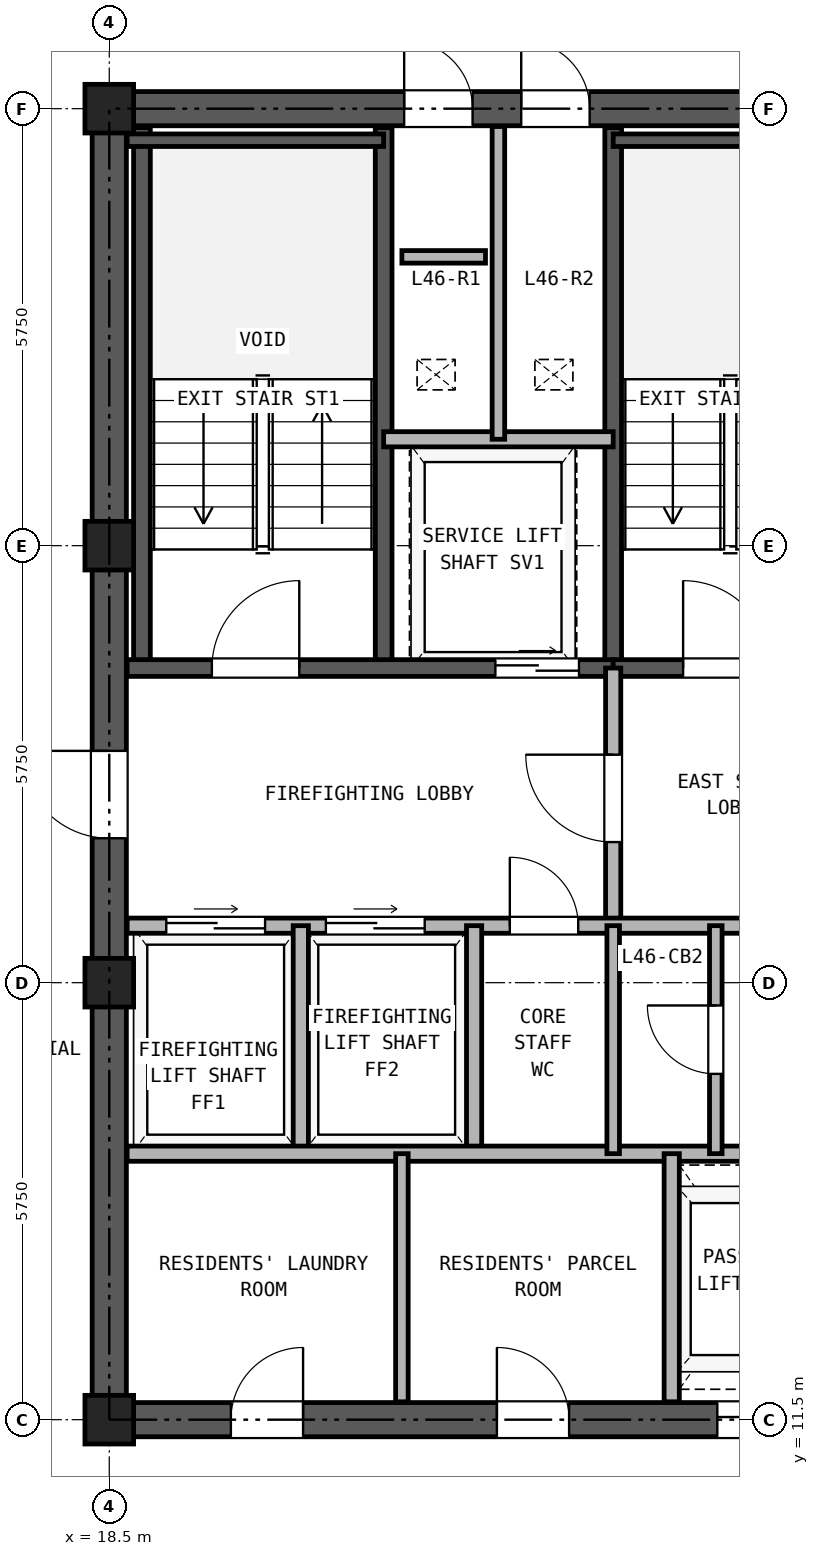
"""IFC4 building model, lengths in metres.
Left out: names, types, materials, properties, quantities, classifications, styles, units other than length and angle.
Written with IfcOpenShell. Run it as: python <this file> out.ifc"""

import sys

from ifc_helpers import new_model, si_unit, direction, frame, frame_2d, origin, origin_2d, place, context, subcontext, project, spatial, rectangle, hollow_rectangle, extrude, source, transform, mapped, element, fill, save


model = new_model("IFC4")
c1 = context("Model", 3, precision=1e-05, world=origin(), true_north=direction((0.0, 1.0)))
c2 = subcontext(c1, "Body", "Model", "MODEL_VIEW")
j1 = project(units=[si_unit("LENGTHUNIT", "METRE"), si_unit("PLANEANGLEUNIT", "RADIAN")], contexts=[c1])
p1 = place(None, origin())
s1 = spatial("IfcSite", under=j1, at=p1, CompositionType="ELEMENT")
p2 = place(p1, origin())
s2 = spatial("IfcBuilding", under=s1, at=p2, CompositionType="ELEMENT")
p3 = place(p2, frame((0.0, 0.0, 165.7)))
s3 = spatial("IfcBuildingStorey", under=s2, at=p3, CompositionType="ELEMENT", Elevation=165.7)
m1 = source(origin(), c2, "Body", "SweptSolid", [
    extrude(hollow_rectangle(XDim=0.64, YDim=0.64, WallThickness=0.035, at=origin_2d()), origin(), (0.0, 0.0, 1.0), 2.95),
])
for number, where, z_axis, x_axis in (
    (1, (18.5, 11.5, 0.0), (0.0, 0.0, 1.0), (1.0, 0.0, 0.0)),
    (2, (18.5, 17.25, 0.0), (0.0, 0.0, 1.0), (1.0, 0.0, 0.0)),
    (3, (18.5, 23.0, 0.0), (0.0, 0.0, 1.0), (1.0, 0.0, 0.0)),
    (4, (18.5, 28.75, 0.0), (0.0, 0.0, 1.0), (1.0, 0.0, 0.0)),
):
    element("IfcColumn", number, at=place(p3, frame(where, z_axis=z_axis, x_axis=x_axis)), inside=s3, PredefinedType="COLUMN", context=c2, shape_type="MappedRepresentation", body=[
        mapped(m1, transform((0.0, 0.0, 0.0), x_axis=(1.0, 0.0, 0.0), y_axis=(0.0, 1.0, 0.0), z_axis=(0.0, 0.0, 1.0), scale=1.0)),
    ])
p4 = place(p3, frame((18.275, 11.5, 0.0), z_axis=(0.0, 0.0, 1.0), x_axis=(1.0, 0.0, 0.0)))
e5 = element("IfcWall", 5, at=p4, inside=s3, PredefinedType="SHEAR", context=c2, shape_type="SweptSolid", body=[
    extrude(rectangle(XDim=10.45, YDim=0.45, at=frame_2d((5.225, 0.0))), origin(), (0.0, 0.0, 1.0), 2.95),
])
p5 = place(p4, frame((1.825, 0.0, 0.0)))
e6 = element("IfcOpeningElement", 6, at=p5, cuts=e5, PredefinedType="OPENING", context=c2, shape_type="SweptSolid", body=[
    extrude(rectangle(XDim=0.95, YDim=2.15, at=frame_2d((0.475, 1.075))), frame((0.0, 0.235, 0.0), z_axis=(0.0, -1.0, 0.0), x_axis=(1.0, 0.0, 0.0)), (0.0, 0.0, 1.0), 0.47),
])
p6 = place(p4, frame((5.325, 0.0, 0.0)))
e7 = element("IfcOpeningElement", 7, at=p6, cuts=e5, PredefinedType="OPENING", context=c2, shape_type="SweptSolid", body=[
    extrude(rectangle(XDim=0.95, YDim=2.15, at=frame_2d((0.475, 1.075))), frame((0.0, 0.235, 0.0), z_axis=(0.0, -1.0, 0.0), x_axis=(1.0, 0.0, 0.0)), (0.0, 0.0, 1.0), 0.47),
])
p7 = place(p4, frame((8.225, 0.0, 0.0)))
e8 = element("IfcOpeningElement", 8, at=p7, cuts=e5, PredefinedType="OPENING", context=c2, shape_type="SweptSolid", body=[
    extrude(rectangle(XDim=1.1, YDim=2.25, at=frame_2d((0.55, 1.125))), frame((0.0, 0.235, 0.0), z_axis=(0.0, -1.0, 0.0), x_axis=(1.0, 0.0, 0.0)), (0.0, 0.0, 1.0), 0.47),
])
p8 = place(p3, frame((18.275, 28.75, 0.0), z_axis=(0.0, 0.0, 1.0), x_axis=(1.0, 0.0, 0.0)))
e9 = element("IfcWall", 9, at=p8, inside=s3, PredefinedType="SHEAR", context=c2, shape_type="SweptSolid", body=[
    extrude(rectangle(XDim=10.45, YDim=0.45, at=frame_2d((5.225, 0.0))), origin(), (0.0, 0.0, 1.0), 2.95),
])
p9 = place(p8, frame((4.105, 0.0, 0.0)))
e10 = element("IfcOpeningElement", 10, at=p9, cuts=e9, PredefinedType="OPENING", context=c2, shape_type="SweptSolid", body=[
    extrude(rectangle(XDim=0.9, YDim=2.05, at=frame_2d((0.45, 1.025))), frame((0.0, 0.235, 0.0), z_axis=(0.0, -1.0, 0.0), x_axis=(1.0, 0.0, 0.0)), (0.0, 0.0, 1.0), 0.47),
])
p10 = place(p8, frame((5.645, 0.0, 0.0)))
e11 = element("IfcOpeningElement", 11, at=p10, cuts=e9, PredefinedType="OPENING", context=c2, shape_type="SweptSolid", body=[
    extrude(rectangle(XDim=0.9, YDim=2.05, at=frame_2d((0.45, 1.025))), frame((0.0, 0.235, 0.0), z_axis=(0.0, -1.0, 0.0), x_axis=(1.0, 0.0, 0.0)), (0.0, 0.0, 1.0), 0.47),
])
p11 = place(p3, frame((18.5, 11.725, 0.0), z_axis=(0.0, 0.0, 1.0), x_axis=(0.0, 1.0, 0.0)))
e12 = element("IfcWall", 12, at=p11, inside=s3, PredefinedType="SHEAR", context=c2, shape_type="SweptSolid", body=[
    extrude(rectangle(XDim=16.8, YDim=0.45, at=frame_2d((8.4, 0.0))), origin(), (0.0, 0.0, 1.0), 2.95),
])
p12 = place(p11, frame((7.425, 0.0, 0.0)))
e13 = element("IfcOpeningElement", 13, at=p12, cuts=e12, PredefinedType="OPENING", context=c2, shape_type="SweptSolid", body=[
    extrude(rectangle(XDim=1.15, YDim=2.2, at=frame_2d((0.575, 1.1))), frame((0.0, 0.235, 0.0), z_axis=(0.0, -1.0, 0.0), x_axis=(1.0, 0.0, 0.0)), (0.0, 0.0, 1.0), 0.47),
])
for number, where, z_axis, x_axis in (
    (14, (18.93, 21.39, 0.0), (0.0, 0.0, 1.0), (0.0, 1.0, 0.0)),
    (15, (22.11, 21.39, 0.0), (0.0, 0.0, 1.0), (0.0, 1.0, 0.0)),
    (16, (25.13, 21.39, 0.0), (0.0, 0.0, 1.0), (0.0, 1.0, 0.0)),
):
    element("IfcWall", number, at=place(p3, frame(where, z_axis=z_axis, x_axis=x_axis)), inside=s3, PredefinedType="SOLIDWALL", context=c2, shape_type="SweptSolid", body=[
        extrude(rectangle(XDim=7.11, YDim=0.22, at=frame_2d((3.555, 0.0))), origin(), (0.0, 0.0, 1.0), 2.95),
    ])
p13 = place(p3, frame((18.735, 28.335, 0.0), z_axis=(0.0, 0.0, 1.0), x_axis=(1.0, 0.0, 0.0)))
e17 = element("IfcWall", 17, at=p13, inside=s3, PredefinedType="PARTITIONING", context=c2, shape_type="SweptSolid", body=[
    extrude(rectangle(XDim=3.375, YDim=0.165, at=frame_2d((1.688, 0.0))), origin(), (0.0, 0.0, 1.0), 2.95),
])
p14 = place(p3, frame((25.13, 28.335, 0.0), z_axis=(0.0, 0.0, 1.0), x_axis=(1.0, 0.0, 0.0)))
e18 = element("IfcWall", 18, at=p14, inside=s3, PredefinedType="PARTITIONING", context=c2, shape_type="SweptSolid", body=[
    extrude(rectangle(XDim=3.135, YDim=0.165, at=frame_2d((1.567, 0.0))), origin(), (0.0, 0.0, 1.0), 2.95),
])
p15 = place(p3, frame((18.735, 21.39, 0.0), z_axis=(0.0, 0.0, 1.0), x_axis=(1.0, 0.0, 0.0)))
e19 = element("IfcWall", 19, at=p15, inside=s3, PredefinedType="SOLIDWALL", context=c2, shape_type="SweptSolid", body=[
    extrude(rectangle(XDim=6.395, YDim=0.22, at=frame_2d((3.197, 0.0))), origin(), (0.0, 0.0, 1.0), 2.95),
])
p16 = place(p15, frame((1.115, 0.0, 0.0)))
e20 = element("IfcOpeningElement", 20, at=p16, cuts=e19, PredefinedType="OPENING", context=c2, shape_type="SweptSolid", body=[
    extrude(rectangle(XDim=1.15, YDim=2.2, at=frame_2d((0.575, 1.1))), frame((0.0, 0.12, 0.0), z_axis=(0.0, -1.0, 0.0), x_axis=(1.0, 0.0, 0.0)), (0.0, 0.0, 1.0), 0.24),
])
p17 = place(p15, frame((4.845, 0.0, 0.0)))
e21 = element("IfcOpeningElement", 21, at=p17, cuts=e19, PredefinedType="OPENING", context=c2, shape_type="SweptSolid", body=[
    extrude(rectangle(XDim=1.1, YDim=2.25, at=frame_2d((0.55, 1.125))), frame((0.0, 0.12, 0.0), z_axis=(0.0, -1.0, 0.0), x_axis=(1.0, 0.0, 0.0)), (0.0, 0.0, 1.0), 0.24),
])
p18 = place(p3, frame((25.13, 21.39, 0.0), z_axis=(0.0, 0.0, 1.0), x_axis=(1.0, 0.0, 0.0)))
e22 = element("IfcWall", 22, at=p18, inside=s3, PredefinedType="SOLIDWALL", context=c2, shape_type="SweptSolid", body=[
    extrude(rectangle(XDim=3.135, YDim=0.22, at=frame_2d((1.567, 0.0))), origin(), (0.0, 0.0, 1.0), 2.95),
])
p19 = place(p18, frame((0.92, 0.0, 0.0)))
e23 = element("IfcOpeningElement", 23, at=p19, cuts=e22, PredefinedType="OPENING", context=c2, shape_type="SweptSolid", body=[
    extrude(rectangle(XDim=1.15, YDim=2.2, at=frame_2d((0.575, 1.1))), frame((0.0, 0.12, 0.0), z_axis=(0.0, -1.0, 0.0), x_axis=(1.0, 0.0, 0.0)), (0.0, 0.0, 1.0), 0.24),
])
p20 = place(p3, frame((22.11, 24.4, 0.0), z_axis=(0.0, 0.0, 1.0), x_axis=(1.0, 0.0, 0.0)))
e24 = element("IfcWall", 24, at=p20, inside=s3, PredefinedType="PARTITIONING", context=c2, shape_type="SweptSolid", body=[
    extrude(rectangle(XDim=3.02, YDim=0.2, at=frame_2d((1.51, 0.0))), origin(), (0.0, 0.0, 1.0), 2.95),
])
p21 = place(p3, frame((23.62, 24.4, 0.0), z_axis=(0.0, 0.0, 1.0), x_axis=(0.0, 1.0, 0.0)))
e25 = element("IfcWall", 25, at=p21, inside=s3, PredefinedType="PARTITIONING", context=c2, shape_type="SweptSolid", body=[
    extrude(rectangle(XDim=4.115, YDim=0.165, at=frame_2d((2.058, 0.0))), origin(), (0.0, 0.0, 1.0), 2.95),
])
p22 = place(p3, frame((25.13, 18.0, 0.0), z_axis=(0.0, 0.0, 1.0), x_axis=(0.0, 1.0, 0.0)))
e26 = element("IfcWall", 26, at=p22, inside=s3, PredefinedType="PARTITIONING", context=c2, shape_type="SweptSolid", body=[
    extrude(rectangle(XDim=3.39, YDim=0.2, at=frame_2d((1.695, 0.0))), origin(), (0.0, 0.0, 1.0), 2.95),
])
p23 = place(p22, frame((1.1, 0.0, 0.0)))
e27 = element("IfcOpeningElement", 27, at=p23, cuts=e26, PredefinedType="OPENING", context=c2, shape_type="SweptSolid", body=[
    extrude(rectangle(XDim=1.15, YDim=2.2, at=frame_2d((0.575, 1.1))), frame((0.0, 0.11, 0.0), z_axis=(0.0, -1.0, 0.0), x_axis=(1.0, 0.0, 0.0)), (0.0, 0.0, 1.0), 0.22),
])
p24 = place(p3, frame((18.735, 18.0, 0.0), z_axis=(0.0, 0.0, 1.0), x_axis=(1.0, 0.0, 0.0)))
e28 = element("IfcWall", 28, at=p24, inside=s3, PredefinedType="PARTITIONING", context=c2, shape_type="SweptSolid", body=[
    extrude(rectangle(XDim=9.53, YDim=0.2, at=frame_2d((4.765, 0.0))), origin(), (0.0, 0.0, 1.0), 2.95),
])
p25 = place(p24, frame((0.515, 0.0, 0.0)))
e29 = element("IfcOpeningElement", 29, at=p25, cuts=e28, PredefinedType="OPENING", context=c2, shape_type="SweptSolid", body=[
    extrude(rectangle(XDim=1.3, YDim=2.3, at=frame_2d((0.65, 1.15))), frame((0.0, 0.11, 0.0), z_axis=(0.0, -1.0, 0.0), x_axis=(1.0, 0.0, 0.0)), (0.0, 0.0, 1.0), 0.22),
])
p26 = place(p24, frame((2.615, 0.0, 0.0)))
e30 = element("IfcOpeningElement", 30, at=p26, cuts=e28, PredefinedType="OPENING", context=c2, shape_type="SweptSolid", body=[
    extrude(rectangle(XDim=1.3, YDim=2.3, at=frame_2d((0.65, 1.15))), frame((0.0, 0.11, 0.0), z_axis=(0.0, -1.0, 0.0), x_axis=(1.0, 0.0, 0.0)), (0.0, 0.0, 1.0), 0.22),
])
p27 = place(p24, frame((5.035, 0.0, 0.0)))
e31 = element("IfcOpeningElement", 31, at=p27, cuts=e28, PredefinedType="OPENING", context=c2, shape_type="SweptSolid", body=[
    extrude(rectangle(XDim=0.9, YDim=2.05, at=frame_2d((0.45, 1.025))), frame((0.0, 0.11, 0.0), z_axis=(0.0, -1.0, 0.0), x_axis=(1.0, 0.0, 0.0)), (0.0, 0.0, 1.0), 0.22),
])
p28 = place(p24, frame((8.165, 0.0, 0.0)))
e32 = element("IfcOpeningElement", 32, at=p28, cuts=e28, PredefinedType="OPENING", context=c2, shape_type="SweptSolid", body=[
    extrude(rectangle(XDim=0.9, YDim=2.05, at=frame_2d((0.45, 1.025))), frame((0.0, 0.11, 0.0), z_axis=(0.0, -1.0, 0.0), x_axis=(1.0, 0.0, 0.0)), (0.0, 0.0, 1.0), 0.22),
])
for number, where, z_axis, x_axis in (
    (33, (21.02, 15.0, 0.0), (0.0, 0.0, 1.0), (0.0, 1.0, 0.0)),
    (34, (23.3, 15.0, 0.0), (0.0, 0.0, 1.0), (0.0, 1.0, 0.0)),
):
    element("IfcWall", number, at=place(p3, frame(where, z_axis=z_axis, x_axis=x_axis)), inside=s3, PredefinedType="PARTITIONING", context=c2, shape_type="SweptSolid", body=[
        extrude(rectangle(XDim=3.0, YDim=0.2, at=frame_2d((1.5, 0.0))), origin(), (0.0, 0.0, 1.0), 2.95),
    ])
p29 = place(p3, frame((18.735, 15.0, 0.0), z_axis=(0.0, 0.0, 1.0), x_axis=(1.0, 0.0, 0.0)))
e35 = element("IfcWall", 35, at=p29, inside=s3, PredefinedType="PARTITIONING", context=c2, shape_type="SweptSolid", body=[
    extrude(rectangle(XDim=9.53, YDim=0.2, at=frame_2d((4.765, 0.0))), origin(), (0.0, 0.0, 1.0), 2.95),
])
p30 = place(p3, frame((25.13, 15.0, 0.0), z_axis=(0.0, 0.0, 1.0), x_axis=(0.0, 1.0, 0.0)))
e36 = element("IfcWall", 36, at=p30, inside=s3, PredefinedType="PARTITIONING", context=c2, shape_type="SweptSolid", body=[
    extrude(rectangle(XDim=3.0, YDim=0.165, at=frame_2d((1.5, 0.0))), origin(), (0.0, 0.0, 1.0), 2.95),
])
p31 = place(p3, frame((26.48, 15.0, 0.0), z_axis=(0.0, 0.0, 1.0), x_axis=(0.0, 1.0, 0.0)))
e37 = element("IfcWall", 37, at=p31, inside=s3, PredefinedType="PARTITIONING", context=c2, shape_type="SweptSolid", body=[
    extrude(rectangle(XDim=3.0, YDim=0.165, at=frame_2d((1.5, 0.0))), origin(), (0.0, 0.0, 1.0), 2.95),
])
p32 = place(p31, frame((1.05, 0.0, 0.0)))
e38 = element("IfcOpeningElement", 38, at=p32, cuts=e37, PredefinedType="OPENING", context=c2, shape_type="SweptSolid", body=[
    extrude(rectangle(XDim=0.9, YDim=2.05, at=frame_2d((0.45, 1.025))), frame((0.0, 0.093, 0.0), z_axis=(0.0, -1.0, 0.0), x_axis=(1.0, 0.0, 0.0)), (0.0, 0.0, 1.0), 0.185),
])
p33 = place(p3, frame((22.35, 11.735, 0.0), z_axis=(0.0, 0.0, 1.0), x_axis=(0.0, 1.0, 0.0)))
e39 = element("IfcWall", 39, at=p33, inside=s3, PredefinedType="PARTITIONING", context=c2, shape_type="SweptSolid", body=[
    extrude(rectangle(XDim=3.265, YDim=0.165, at=frame_2d((1.632, 0.0))), origin(), (0.0, 0.0, 1.0), 2.95),
])
p34 = place(p3, frame((25.9, 11.735, 0.0), z_axis=(0.0, 0.0, 1.0), x_axis=(0.0, 1.0, 0.0)))
e40 = element("IfcWall", 40, at=p34, inside=s3, PredefinedType="PARTITIONING", context=c2, shape_type="SweptSolid", body=[
    extrude(rectangle(XDim=3.265, YDim=0.2, at=frame_2d((1.632, 0.0))), origin(), (0.0, 0.0, 1.0), 2.95),
])
p35 = place(p3, frame((22.35, 26.8, 0.0), z_axis=(0.0, 0.0, 1.0), x_axis=(1.0, 0.0, 0.0)))
e41 = element("IfcWall", 41, at=p35, inside=s3, PredefinedType="PARTITIONING", context=c2, shape_type="SweptSolid", body=[
    extrude(rectangle(XDim=1.1, YDim=0.165, at=frame_2d((0.55, 0.0))), origin(), (0.0, 0.0, 1.0), 2.95),
])
p36 = place(p16, frame((1.15, 0.0, 0.0), z_axis=(0.0, 0.0, 1.0), x_axis=(-1.0, 0.0, 0.0)))
e42 = element("IfcDoor", 42, at=p36, inside=s3, OperationType="SINGLE_SWING_RIGHT", PredefinedType="DOOR", context=c2, shape_type="SweptSolid", body=[
    extrude(rectangle(XDim=1.15, YDim=2.2, at=frame_2d((0.575, 1.1))), frame((0.0, 0.025, 0.0), z_axis=(0.0, -1.0, 0.0), x_axis=(1.0, 0.0, 0.0)), (0.0, 0.0, 1.0), 0.05),
])
fill(e20, e42)
p37 = place(p19, frame((1.15, 0.0, 0.0), z_axis=(0.0, 0.0, 1.0), x_axis=(-1.0, 0.0, 0.0)))
e43 = element("IfcDoor", 43, at=p37, inside=s3, OperationType="SINGLE_SWING_LEFT", PredefinedType="DOOR", context=c2, shape_type="SweptSolid", body=[
    extrude(rectangle(XDim=1.15, YDim=2.2, at=frame_2d((0.575, 1.1))), frame((0.0, 0.025, 0.0), z_axis=(0.0, -1.0, 0.0), x_axis=(1.0, 0.0, 0.0)), (0.0, 0.0, 1.0), 0.05),
])
fill(e23, e43)
p38 = place(p17, frame((1.1, 0.0, 0.0), z_axis=(0.0, 0.0, 1.0), x_axis=(-1.0, 0.0, 0.0)))
e44 = element("IfcDoor", 44, at=p38, inside=s3, OperationType="DOUBLE_DOOR_SLIDING", PredefinedType="DOOR", context=c2, shape_type="SweptSolid", body=[
    extrude(rectangle(XDim=1.1, YDim=2.25, at=frame_2d((0.55, 1.125))), frame((0.0, 0.025, 0.0), z_axis=(0.0, -1.0, 0.0), x_axis=(1.0, 0.0, 0.0)), (0.0, 0.0, 1.0), 0.05),
])
fill(e21, e44)
p39 = place(p23, origin())
e45 = element("IfcDoor", 45, at=p39, inside=s3, OperationType="SINGLE_SWING_RIGHT", PredefinedType="DOOR", context=c2, shape_type="SweptSolid", body=[
    extrude(rectangle(XDim=1.15, YDim=2.2, at=frame_2d((0.575, 1.1))), frame((0.0, 0.025, 0.0), z_axis=(0.0, -1.0, 0.0), x_axis=(1.0, 0.0, 0.0)), (0.0, 0.0, 1.0), 0.05),
])
fill(e27, e45)
p40 = place(p25, origin())
e46 = element("IfcDoor", 46, at=p40, inside=s3, OperationType="DOUBLE_DOOR_SLIDING", PredefinedType="DOOR", context=c2, shape_type="SweptSolid", body=[
    extrude(rectangle(XDim=1.3, YDim=2.3, at=frame_2d((0.65, 1.15))), frame((0.0, 0.025, 0.0), z_axis=(0.0, -1.0, 0.0), x_axis=(1.0, 0.0, 0.0)), (0.0, 0.0, 1.0), 0.05),
])
fill(e29, e46)
p41 = place(p26, origin())
e47 = element("IfcDoor", 47, at=p41, inside=s3, OperationType="DOUBLE_DOOR_SLIDING", PredefinedType="DOOR", context=c2, shape_type="SweptSolid", body=[
    extrude(rectangle(XDim=1.3, YDim=2.3, at=frame_2d((0.65, 1.15))), frame((0.0, 0.025, 0.0), z_axis=(0.0, -1.0, 0.0), x_axis=(1.0, 0.0, 0.0)), (0.0, 0.0, 1.0), 0.05),
])
fill(e30, e47)
p42 = place(p27, frame((0.9, 0.0, 0.0), z_axis=(0.0, 0.0, 1.0), x_axis=(-1.0, 0.0, 0.0)))
e48 = element("IfcDoor", 48, at=p42, inside=s3, OperationType="SINGLE_SWING_LEFT", PredefinedType="DOOR", context=c2, shape_type="SweptSolid", body=[
    extrude(rectangle(XDim=0.9, YDim=2.05, at=frame_2d((0.45, 1.025))), frame((0.0, 0.025, 0.0), z_axis=(0.0, -1.0, 0.0), x_axis=(1.0, 0.0, 0.0)), (0.0, 0.0, 1.0), 0.05),
])
fill(e31, e48)
p43 = place(p32, origin())
e49 = element("IfcDoor", 49, at=p43, inside=s3, OperationType="SINGLE_SWING_RIGHT", PredefinedType="DOOR", context=c2, shape_type="SweptSolid", body=[
    extrude(rectangle(XDim=0.9, YDim=2.05, at=frame_2d((0.45, 1.025))), frame((0.0, 0.025, 0.0), z_axis=(0.0, -1.0, 0.0), x_axis=(1.0, 0.0, 0.0)), (0.0, 0.0, 1.0), 0.05),
])
fill(e38, e49)
p44 = place(p12, frame((1.15, 0.0, 0.0), z_axis=(0.0, 0.0, 1.0), x_axis=(-1.0, 0.0, 0.0)))
e50 = element("IfcDoor", 50, at=p44, inside=s3, OperationType="SINGLE_SWING_RIGHT", PredefinedType="DOOR", context=c2, shape_type="SweptSolid", body=[
    extrude(rectangle(XDim=1.15, YDim=2.2, at=frame_2d((0.575, 1.1))), frame((0.0, 0.025, 0.0), z_axis=(0.0, -1.0, 0.0), x_axis=(1.0, 0.0, 0.0)), (0.0, 0.0, 1.0), 0.05),
])
fill(e13, e50)
p45 = place(p9, origin())
e51 = element("IfcDoor", 51, at=p45, inside=s3, OperationType="SINGLE_SWING_LEFT", PredefinedType="DOOR", context=c2, shape_type="SweptSolid", body=[
    extrude(rectangle(XDim=0.9, YDim=2.05, at=frame_2d((0.45, 1.025))), frame((0.0, 0.025, 0.0), z_axis=(0.0, -1.0, 0.0), x_axis=(1.0, 0.0, 0.0)), (0.0, 0.0, 1.0), 0.05),
])
fill(e10, e51)
p46 = place(p10, origin())
e52 = element("IfcDoor", 52, at=p46, inside=s3, OperationType="SINGLE_SWING_LEFT", PredefinedType="DOOR", context=c2, shape_type="SweptSolid", body=[
    extrude(rectangle(XDim=0.9, YDim=2.05, at=frame_2d((0.45, 1.025))), frame((0.0, 0.025, 0.0), z_axis=(0.0, -1.0, 0.0), x_axis=(1.0, 0.0, 0.0)), (0.0, 0.0, 1.0), 0.05),
])
fill(e11, e52)
p47 = place(p5, frame((0.95, 0.0, 0.0), z_axis=(0.0, 0.0, 1.0), x_axis=(-1.0, 0.0, 0.0)))
e53 = element("IfcDoor", 53, at=p47, inside=s3, OperationType="SINGLE_SWING_RIGHT", PredefinedType="DOOR", context=c2, shape_type="SweptSolid", body=[
    extrude(rectangle(XDim=0.95, YDim=2.15, at=frame_2d((0.475, 1.075))), frame((0.0, 0.025, 0.0), z_axis=(0.0, -1.0, 0.0), x_axis=(1.0, 0.0, 0.0)), (0.0, 0.0, 1.0), 0.05),
])
fill(e6, e53)
p48 = place(p6, frame((0.95, 0.0, 0.0), z_axis=(0.0, 0.0, 1.0), x_axis=(-1.0, 0.0, 0.0)))
e54 = element("IfcDoor", 54, at=p48, inside=s3, OperationType="SINGLE_SWING_LEFT", PredefinedType="DOOR", context=c2, shape_type="SweptSolid", body=[
    extrude(rectangle(XDim=0.95, YDim=2.15, at=frame_2d((0.475, 1.075))), frame((0.0, 0.025, 0.0), z_axis=(0.0, -1.0, 0.0), x_axis=(1.0, 0.0, 0.0)), (0.0, 0.0, 1.0), 0.05),
])
fill(e7, e54)
p49 = place(p7, frame((1.1, 0.0, 0.0), z_axis=(0.0, 0.0, 1.0), x_axis=(-1.0, 0.0, 0.0)))
e55 = element("IfcDoor", 55, at=p49, inside=s3, OperationType="DOUBLE_DOOR_SLIDING", PredefinedType="DOOR", context=c2, shape_type="SweptSolid", body=[
    extrude(rectangle(XDim=1.1, YDim=2.25, at=frame_2d((0.55, 1.125))), frame((0.0, 0.025, 0.0), z_axis=(0.0, -1.0, 0.0), x_axis=(1.0, 0.0, 0.0)), (0.0, 0.0, 1.0), 0.05),
])
fill(e8, e55)
save(model, sys.argv[1])
